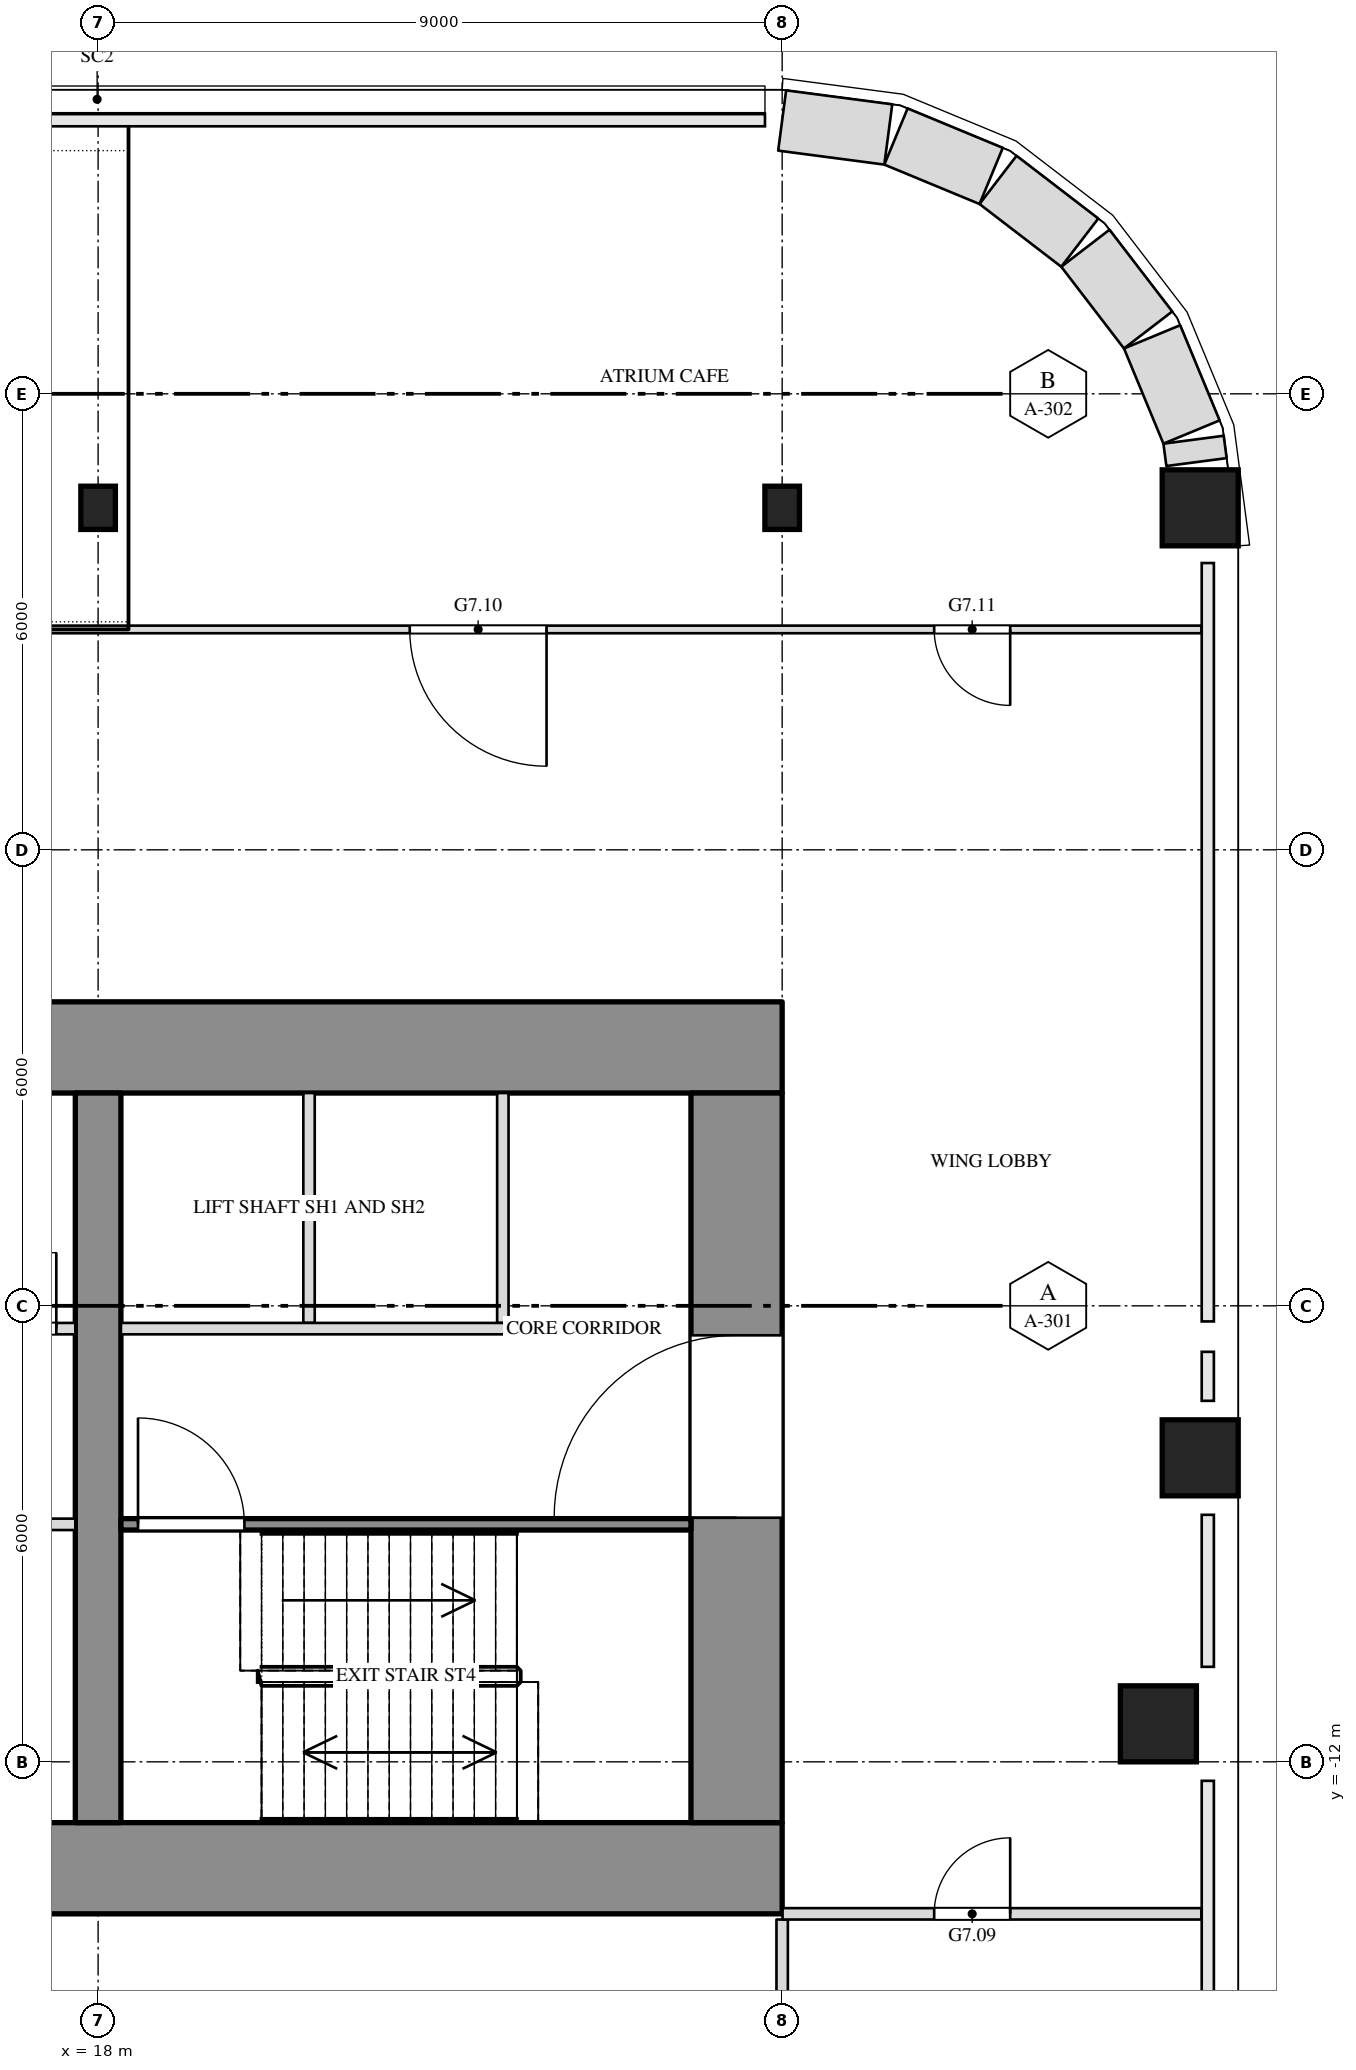
"""IFC4 building model, lengths in metres.
Left out: names, types, materials, properties, quantities, classifications, styles, units other than length and angle.
Written with IfcOpenShell. Run it as: python <this file> out.ifc"""

import sys

from ifc_helpers import new_model, si_unit, direction, frame, frame_2d, origin, origin_2d, place, context, subcontext, project, spatial, rectangle, i_section, extrude, element, fill, save


model = new_model("IFC4")
c1 = context("Model", 3, precision=1e-05, world=origin(), true_north=direction((0.0, 1.0)))
c2 = subcontext(c1, "Body", "Model", "MODEL_VIEW")
j1 = project(units=[si_unit("LENGTHUNIT", "METRE"), si_unit("PLANEANGLEUNIT", "RADIAN")], contexts=[c1])
p1 = place(None, origin())
s1 = spatial("IfcSite", under=j1, at=p1, CompositionType="ELEMENT")
p2 = place(p1, origin())
s2 = spatial("IfcBuilding", under=s1, at=p2, CompositionType="ELEMENT")
p3 = place(p2, frame((0.0, 0.0, 43.5)))
s3 = spatial("IfcBuildingStorey", under=s2, at=p3, CompositionType="ELEMENT", Elevation=43.5)
for number, where, z_axis, x_axis in (
    (1, (31.95, -11.5, 0.0), (0.0, 0.0, 1.0), (1.0, 0.0, 0.0)),
    (2, (32.5, -8.0, 0.0), (0.0, 0.0, 1.0), (1.0, 0.0, 0.0)),
):
    element("IfcColumn", number, at=place(p3, frame(where, z_axis=z_axis, x_axis=x_axis)), inside=s3, PredefinedType="COLUMN", context=c2, shape_type="SweptSolid", body=[
        extrude(rectangle(XDim=1.0, YDim=1.0, at=origin_2d()), origin(), (0.0, 0.0, 1.0), 4.5),
    ])
for number, where, z_axis, x_axis in (
    (3, (18.0, 4.5, 0.0), (0.0, 0.0, 1.0), (1.0, 0.0, 0.0)),
    (4, (27.0, 4.5, 0.0), (0.0, 0.0, 1.0), (1.0, 0.0, 0.0)),
):
    element("IfcColumn", number, at=place(p3, frame(where, z_axis=z_axis, x_axis=x_axis)), inside=s3, PredefinedType="COLUMN", context=c2, shape_type="SweptSolid", body=[
        extrude(i_section(OverallWidth=0.455, OverallDepth=0.569, WebThickness=0.078, FlangeThickness=0.125, at=origin_2d()), origin(), (0.0, 0.0, 1.0), 4.5),
    ])
p4 = place(p3, frame((32.5, 4.5, 0.0), z_axis=(0.0, 0.0, 1.0), x_axis=(1.0, 0.0, 0.0)))
e5 = element("IfcColumn", 5, at=p4, inside=s3, PredefinedType="COLUMN", context=c2, shape_type="SweptSolid", body=[
    extrude(rectangle(XDim=1.0, YDim=1.0, at=origin_2d()), origin(), (0.0, 0.0, 1.0), 4.5),
])
p5 = place(p3, frame((-27.0, -2.6, 0.0), z_axis=(0.0, 0.0, 1.0), x_axis=(1.0, 0.0, 0.0)))
e6 = element("IfcWall", 6, at=p5, inside=s3, PredefinedType="SHEAR", context=c2, shape_type="SweptSolid", body=[
    extrude(rectangle(XDim=54.0, YDim=1.2, at=frame_2d((27.0, 0.0))), origin(), (0.0, 0.0, 1.0), 4.25),
])
p6 = place(p5, frame((15.15, 0.0, 0.0)))
e7 = element("IfcOpeningElement", 7, at=p6, cuts=e6, PredefinedType="OPENING", context=c2, shape_type="SweptSolid", body=[
    extrude(rectangle(XDim=2.4, YDim=2.1, at=frame_2d((1.2, 1.05))), frame((0.0, 0.612, 0.0), z_axis=(0.0, -1.0, 0.0), x_axis=(1.0, 0.0, 0.0)), (0.0, 0.0, 1.0), 1.224),
])
p7 = place(p5, frame((36.45, 0.0, 0.0)))
e8 = element("IfcOpeningElement", 8, at=p7, cuts=e6, PredefinedType="OPENING", context=c2, shape_type="SweptSolid", body=[
    extrude(rectangle(XDim=2.4, YDim=2.1, at=frame_2d((1.2, 1.05))), frame((0.0, 0.612, 0.0), z_axis=(0.0, -1.0, 0.0), x_axis=(1.0, 0.0, 0.0)), (0.0, 0.0, 1.0), 1.224),
])
p8 = place(p3, frame((-27.0, -13.4, 0.0), z_axis=(0.0, 0.0, 1.0), x_axis=(1.0, 0.0, 0.0)))
e9 = element("IfcWall", 9, at=p8, inside=s3, PredefinedType="SHEAR", context=c2, shape_type="SweptSolid", body=[
    extrude(rectangle(XDim=54.0, YDim=1.2, at=frame_2d((27.0, 0.0))), origin(), (0.0, 0.0, 1.0), 4.25),
])
p9 = place(p8, frame((16.45, 0.0, 0.0)))
e10 = element("IfcOpeningElement", 10, at=p9, cuts=e9, PredefinedType="OPENING", context=c2, shape_type="SweptSolid", body=[
    extrude(rectangle(XDim=1.0, YDim=2.1, at=frame_2d((0.5, 1.05))), frame((0.0, 0.612, 0.0), z_axis=(0.0, -1.0, 0.0), x_axis=(1.0, 0.0, 0.0)), (0.0, 0.0, 1.0), 1.224),
])
p10 = place(p8, frame((36.55, 0.0, 0.0)))
e11 = element("IfcOpeningElement", 11, at=p10, cuts=e9, PredefinedType="OPENING", context=c2, shape_type="SweptSolid", body=[
    extrude(rectangle(XDim=1.0, YDim=2.1, at=frame_2d((0.5, 1.05))), frame((0.0, 0.612, 0.0), z_axis=(0.0, -1.0, 0.0), x_axis=(1.0, 0.0, 0.0)), (0.0, 0.0, 1.0), 1.224),
])
p11 = place(p3, frame((26.4, -12.8, 0.0), z_axis=(0.0, 0.0, 1.0), x_axis=(0.0, 1.0, 0.0)))
e12 = element("IfcWall", 12, at=p11, inside=s3, PredefinedType="SHEAR", context=c2, shape_type="SweptSolid", body=[
    extrude(rectangle(XDim=9.6, YDim=1.2, at=frame_2d((4.8, 0.0))), origin(), (0.0, 0.0, 1.0), 4.25),
])
p12 = place(p11, frame((4.012, 0.0, 0.0)))
e13 = element("IfcOpeningElement", 13, at=p12, cuts=e12, PredefinedType="OPENING", context=c2, shape_type="SweptSolid", body=[
    extrude(rectangle(XDim=2.4, YDim=2.1, at=frame_2d((1.2, 1.05))), frame((0.0, 0.612, 0.0), z_axis=(0.0, -1.0, 0.0), x_axis=(1.0, 0.0, 0.0)), (0.0, 0.0, 1.0), 1.224),
])
p13 = place(p3, frame((18.0, -12.8, 0.0), z_axis=(0.0, 0.0, 1.0), x_axis=(0.0, 1.0, 0.0)))
e14 = element("IfcWall", 14, at=p13, inside=s3, PredefinedType="SHEAR", context=c2, shape_type="SweptSolid", body=[
    extrude(rectangle(XDim=9.6, YDim=0.6, at=frame_2d((4.8, 0.0))), origin(), (0.0, 0.0, 1.0), 4.25),
])
p14 = place(p3, frame((27.0, -17.0, 0.0), z_axis=(0.0, 0.0, 1.0), x_axis=(0.0, 1.0, 0.0)))
e15 = element("IfcWall", 15, at=p14, inside=s3, PredefinedType="PARTITIONING", context=c2, shape_type="SweptSolid", body=[
    extrude(rectangle(XDim=2.925, YDim=0.15, at=frame_2d((1.462, 0.0))), origin(), (0.0, 0.0, 1.0), 3.638),
])
p15 = place(p3, frame((27.005, -14.0, 0.0), z_axis=(0.0, 0.0, 1.0), x_axis=(1.0, 0.0, 0.0)))
e16 = element("IfcWall", 16, at=p15, inside=s3, PredefinedType="PARTITIONING", context=c2, shape_type="SweptSolid", body=[
    extrude(rectangle(XDim=5.511, YDim=0.15, at=frame_2d((2.756, 0.0))), origin(), (0.0, 0.0, 1.0), 4.25),
])
p16 = place(p15, frame((1.995, 0.0, 0.0)))
e17 = element("IfcOpeningElement", 17, at=p16, cuts=e16, PredefinedType="OPENING", context=c2, shape_type="SweptSolid", body=[
    extrude(rectangle(XDim=1.0, YDim=2.1, at=frame_2d((0.5, 1.05))), frame((0.0, 0.087, 0.0), z_axis=(0.0, -1.0, 0.0), x_axis=(1.0, 0.0, 0.0)), (0.0, 0.0, 1.0), 0.174),
])
p17 = place(p3, frame((-18.55, 2.9, 0.0), z_axis=(0.0, 0.0, 1.0), x_axis=(1.0, 0.0, 0.0)))
e18 = element("IfcWall", 18, at=p17, inside=s3, PredefinedType="PARTITIONING", context=c2, shape_type="SweptSolid", body=[
    extrude(rectangle(XDim=51.066, YDim=0.1, at=frame_2d((25.533, 0.0))), origin(), (0.0, 0.0, 1.0), 4.25),
])
p18 = place(p17, frame((40.65, 0.0, 0.0)))
e19 = element("IfcOpeningElement", 19, at=p18, cuts=e18, PredefinedType="OPENING", context=c2, shape_type="SweptSolid", body=[
    extrude(rectangle(XDim=1.8, YDim=2.1, at=frame_2d((0.9, 1.05))), frame((0.0, 0.062, 0.0), z_axis=(0.0, -1.0, 0.0), x_axis=(1.0, 0.0, 0.0)), (0.0, 0.0, 1.0), 0.124),
])
p19 = place(p17, frame((47.55, 0.0, 0.0)))
e20 = element("IfcOpeningElement", 20, at=p19, cuts=e18, PredefinedType="OPENING", context=c2, shape_type="SweptSolid", body=[
    extrude(rectangle(XDim=1.0, YDim=2.1, at=frame_2d((0.5, 1.05))), frame((0.0, 0.062, 0.0), z_axis=(0.0, -1.0, 0.0), x_axis=(1.0, 0.0, 0.0)), (0.0, 0.0, 1.0), 0.124),
])
p20 = place(p3, frame((32.451, 5.102, 0.0), z_axis=(0.0, 0.0, 1.0), x_axis=(-0.129901534033, 0.991526899008, 0.0)))
e21 = element("IfcWall", 21, at=p20, inside=s3, PredefinedType="SOLIDWALL", context=c2, shape_type="SweptSolid", body=[
    extrude(rectangle(XDim=0.297, YDim=0.8, at=frame_2d((0.148, 0.0))), origin(), (0.0, 0.0, 1.0), 4.25),
])
p21 = place(p3, frame((32.386, 5.497, 0.0), z_axis=(0.0, 0.0, 1.0), x_axis=(-0.38276009378, 0.923847774587, 0.0)))
e22 = element("IfcWall", 22, at=p21, inside=s3, PredefinedType="SOLIDWALL", context=c2, shape_type="SweptSolid", body=[
    extrude(rectangle(XDim=1.355, YDim=0.8, at=frame_2d((0.678, 0.0))), origin(), (0.0, 0.0, 1.0), 4.25),
])
for number, where, z_axis, x_axis in (
    (23, (31.815, 6.84, 0.0), (0.0, 0.0, 1.0), (-0.609, 0.793, 0.0)),
    (24, (30.916, 7.989, 0.0), (0.0, 0.0, 1.0), (-0.793, 0.609, 0.0)),
):
    element("IfcWall", number, at=place(p3, frame(where, z_axis=z_axis, x_axis=x_axis)), inside=s3, PredefinedType="SOLIDWALL", context=c2, shape_type="SweptSolid", body=[
        extrude(rectangle(XDim=1.356, YDim=0.8, at=frame_2d((0.678, 0.0))), origin(), (0.0, 0.0, 1.0), 4.25),
    ])
p22 = place(p3, frame((29.75, 8.867, 0.0), z_axis=(0.0, 0.0, 1.0), x_axis=(-0.923847774587, 0.38276009378, 0.0)))
e25 = element("IfcWall", 25, at=p22, inside=s3, PredefinedType="SOLIDWALL", context=c2, shape_type="SweptSolid", body=[
    extrude(rectangle(XDim=1.355, YDim=0.8, at=frame_2d((0.678, 0.0))), origin(), (0.0, 0.0, 1.0), 4.25),
])
p23 = place(p3, frame((28.396, 9.413, 0.0), z_axis=(0.0, 0.0, 1.0), x_axis=(-0.99144603414, 0.130517283865, 0.0)))
e26 = element("IfcWall", 26, at=p23, inside=s3, PredefinedType="SOLIDWALL", context=c2, shape_type="SweptSolid", body=[
    extrude(rectangle(XDim=1.408, YDim=0.8, at=frame_2d((0.704, 0.0))), origin(), (0.0, 0.0, 1.0), 4.25),
])
for number, where, z_axis, x_axis in (
    (27, (20.775, -6.225, 0.0), (0.0, 0.0, 1.0), (0.0, 1.0, 0.0)),
    (28, (23.325, -6.225, 0.0), (0.0, 0.0, 1.0), (0.0, 1.0, 0.0)),
):
    element("IfcWall", number, at=place(p3, frame(where, z_axis=z_axis, x_axis=x_axis)), inside=s3, PredefinedType="PARTITIONING", context=c2, shape_type="SweptSolid", body=[
        extrude(rectangle(XDim=3.025, YDim=0.15, at=frame_2d((1.513, 0.0))), origin(), (0.0, 0.0, 1.0), 4.25),
    ])
p24 = place(p3, frame((12.0, -6.3, 0.0), z_axis=(0.0, 0.0, 1.0), x_axis=(1.0, 0.0, 0.0)))
e29 = element("IfcWall", 29, at=p24, inside=s3, PredefinedType="PARTITIONING", context=c2, shape_type="SweptSolid", body=[
    extrude(rectangle(XDim=5.7, YDim=0.15, at=frame_2d((2.85, 0.0))), origin(), (0.0, 0.0, 1.0), 4.25),
])
p25 = place(p24, frame((1.6, 0.0, 0.0)))
e30 = element("IfcOpeningElement", 30, at=p25, cuts=e29, PredefinedType="OPENING", context=c2, shape_type="SweptSolid", body=[
    extrude(rectangle(XDim=1.0, YDim=2.1, at=frame_2d((0.5, 1.05))), frame((0.0, 0.087, 0.0), z_axis=(0.0, -1.0, 0.0), x_axis=(1.0, 0.0, 0.0)), (0.0, 0.0, 1.0), 0.174),
])
p26 = place(p24, frame((4.45, 0.0, 0.0)))
e31 = element("IfcOpeningElement", 31, at=p26, cuts=e29, PredefinedType="OPENING", context=c2, shape_type="SweptSolid", body=[
    extrude(rectangle(XDim=1.0, YDim=2.1, at=frame_2d((0.5, 1.05))), frame((0.0, 0.087, 0.0), z_axis=(0.0, -1.0, 0.0), x_axis=(1.0, 0.0, 0.0)), (0.0, 0.0, 1.0), 0.174),
])
p27 = place(p3, frame((18.3, -6.3, 0.0), z_axis=(0.0, 0.0, 1.0), x_axis=(1.0, 0.0, 0.0)))
e32 = element("IfcWall", 32, at=p27, inside=s3, PredefinedType="PARTITIONING", context=c2, shape_type="SweptSolid", body=[
    extrude(rectangle(XDim=5.1, YDim=0.15, at=frame_2d((2.55, 0.0))), origin(), (0.0, 0.0, 1.0), 4.25),
])
p28 = place(p3, frame((10.8, -8.875, 0.0), z_axis=(0.0, 0.0, 1.0), x_axis=(1.0, 0.0, 0.0)))
e33 = element("IfcWall", 33, at=p28, inside=s3, PredefinedType="PARTITIONING", context=c2, shape_type="SweptSolid", body=[
    extrude(rectangle(XDim=6.9, YDim=0.15, at=frame_2d((3.45, 0.0))), origin(), (0.0, 0.0, 1.0), 4.25),
])
p29 = place(p28, frame((1.6, 0.0, 0.0)))
e34 = element("IfcOpeningElement", 34, at=p29, cuts=e33, PredefinedType="OPENING", context=c2, shape_type="SweptSolid", body=[
    extrude(rectangle(XDim=1.0, YDim=2.1, at=frame_2d((0.5, 1.05))), frame((0.0, 0.087, 0.0), z_axis=(0.0, -1.0, 0.0), x_axis=(1.0, 0.0, 0.0)), (0.0, 0.0, 1.0), 0.174),
])
p30 = place(p28, frame((4.45, 0.0, 0.0)))
e35 = element("IfcOpeningElement", 35, at=p30, cuts=e33, PredefinedType="OPENING", context=c2, shape_type="SweptSolid", body=[
    extrude(rectangle(XDim=1.0, YDim=2.1, at=frame_2d((0.5, 1.05))), frame((0.0, 0.087, 0.0), z_axis=(0.0, -1.0, 0.0), x_axis=(1.0, 0.0, 0.0)), (0.0, 0.0, 1.0), 0.174),
])
p31 = place(p3, frame((18.3, -8.875, 0.0), z_axis=(0.0, 0.0, 1.0), x_axis=(1.0, 0.0, 0.0)))
e36 = element("IfcWall", 36, at=p31, inside=s3, PredefinedType="SHEAR", context=c2, shape_type="SweptSolid", body=[
    extrude(rectangle(XDim=7.5, YDim=0.15, at=frame_2d((3.75, 0.0))), origin(), (0.0, 0.0, 1.0), 4.25),
])
p32 = place(p31, frame((0.225, 0.0, 0.0)))
e37 = element("IfcOpeningElement", 37, at=p32, cuts=e36, PredefinedType="OPENING", context=c2, shape_type="SweptSolid", body=[
    extrude(rectangle(XDim=1.4, YDim=2.1, at=frame_2d((0.7, 1.05))), frame((0.0, 0.087, 0.0), z_axis=(0.0, -1.0, 0.0), x_axis=(1.0, 0.0, 0.0)), (0.0, 0.0, 1.0), 0.174),
])
p33 = place(p16, origin())
e38 = element("IfcDoor", 38, at=p33, inside=s3, OperationType="SINGLE_SWING_RIGHT", PredefinedType="DOOR", context=c2, shape_type="SweptSolid", body=[
    extrude(rectangle(XDim=1.0, YDim=2.1, at=frame_2d((0.5, 1.05))), frame((0.0, 0.025, 0.0), z_axis=(0.0, -1.0, 0.0), x_axis=(1.0, 0.0, 0.0)), (0.0, 0.0, 1.0), 0.05),
])
fill(e17, e38)
p34 = place(p18, origin())
e39 = element("IfcDoor", 39, at=p34, inside=s3, OperationType="DOUBLE_DOOR_SINGLE_SWING", PredefinedType="DOOR", context=c2, shape_type="SweptSolid", body=[
    extrude(rectangle(XDim=1.8, YDim=2.1, at=frame_2d((0.9, 1.05))), frame((0.0, 0.025, 0.0), z_axis=(0.0, -1.0, 0.0), x_axis=(1.0, 0.0, 0.0)), (0.0, 0.0, 1.0), 0.05),
])
fill(e19, e39)
p35 = place(p19, origin())
e40 = element("IfcDoor", 40, at=p35, inside=s3, OperationType="SINGLE_SWING_LEFT", PredefinedType="DOOR", context=c2, shape_type="SweptSolid", body=[
    extrude(rectangle(XDim=1.0, YDim=2.1, at=frame_2d((0.5, 1.05))), frame((0.0, 0.025, 0.0), z_axis=(0.0, -1.0, 0.0), x_axis=(1.0, 0.0, 0.0)), (0.0, 0.0, 1.0), 0.05),
])
fill(e20, e40)
p36 = place(p26, origin())
e41 = element("IfcDoor", 41, at=p36, inside=s3, OperationType="SINGLE_SWING_RIGHT", PredefinedType="DOOR", context=c2, shape_type="SweptSolid", body=[
    extrude(rectangle(XDim=1.0, YDim=2.1, at=frame_2d((0.5, 1.05))), frame((0.0, 0.025, 0.0), z_axis=(0.0, -1.0, 0.0), x_axis=(1.0, 0.0, 0.0)), (0.0, 0.0, 1.0), 0.05),
])
fill(e31, e41)
p37 = place(p32, origin())
e42 = element("IfcDoor", 42, at=p37, inside=s3, OperationType="DOUBLE_DOOR_SINGLE_SWING", PredefinedType="DOOR", context=c2, shape_type="SweptSolid", body=[
    extrude(rectangle(XDim=1.4, YDim=2.1, at=frame_2d((0.7, 1.05))), frame((0.0, 0.025, 0.0), z_axis=(0.0, -1.0, 0.0), x_axis=(1.0, 0.0, 0.0)), (0.0, 0.0, 1.0), 0.05),
])
fill(e37, e42)
p38 = place(p12, origin())
e43 = element("IfcDoor", 43, at=p38, inside=s3, OperationType="DOUBLE_DOOR_SINGLE_SWING", PredefinedType="DOOR", context=c2, shape_type="SweptSolid", body=[
    extrude(rectangle(XDim=2.4, YDim=2.1, at=frame_2d((1.2, 1.05))), frame((0.0, 0.025, 0.0), z_axis=(0.0, -1.0, 0.0), x_axis=(1.0, 0.0, 0.0)), (0.0, 0.0, 1.0), 0.05),
])
fill(e13, e43)
save(model, sys.argv[1])
